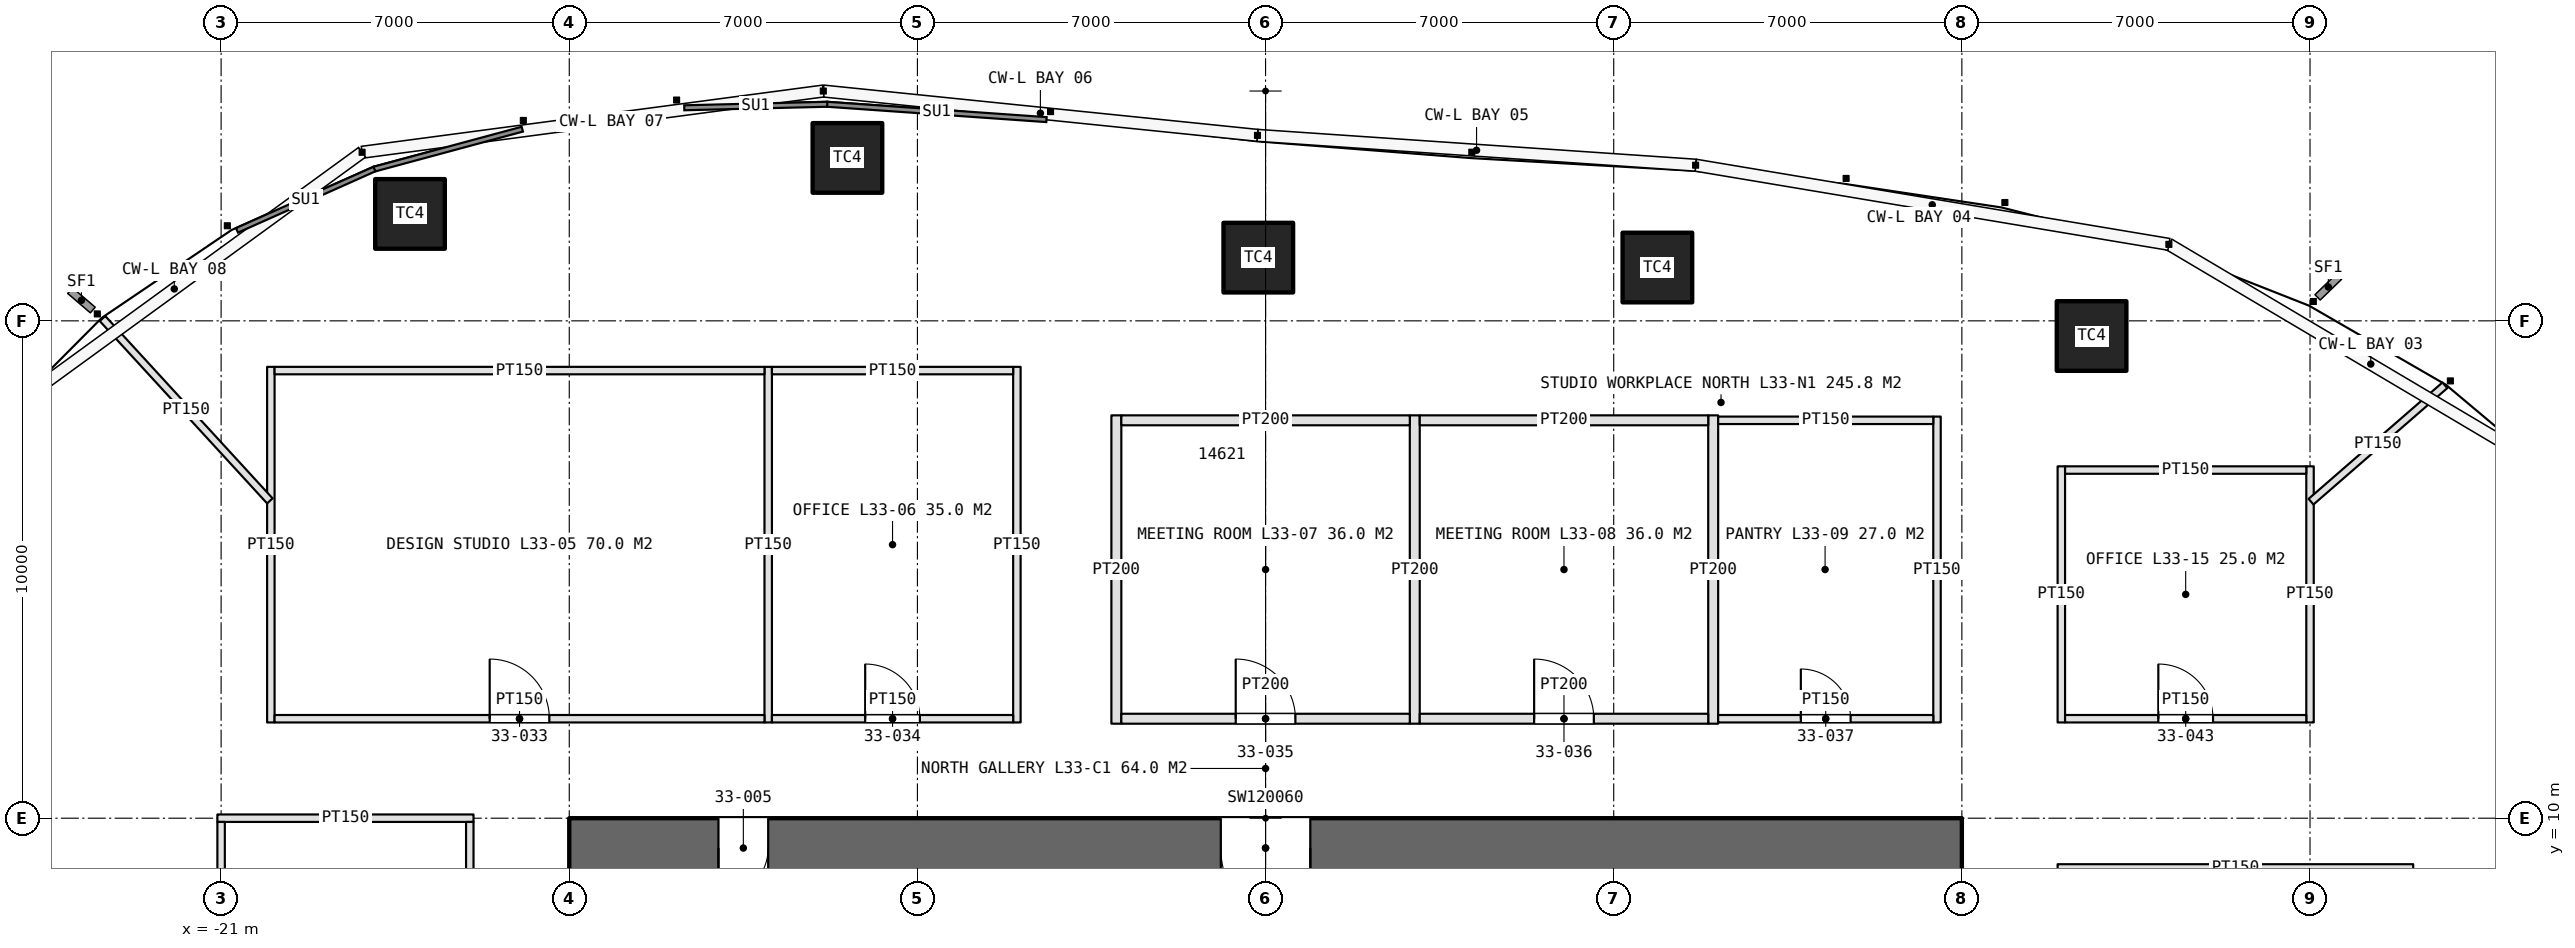
"""IFC4 building model, lengths in metres.
Left out: names, types, materials, properties, quantities, classifications, styles, units other than length and angle.
Written with IfcOpenShell. Run it as: python <this file> out.ifc"""

import sys

from ifc_helpers import new_model, si_unit, direction, frame, frame_2d, origin, origin_2d, place, context, subcontext, project, spatial, rectangle, extrude, element, fill, save


model = new_model("IFC4")
c1 = context("Model", 3, precision=1e-05, world=origin(), true_north=direction((0.0, 1.0)))
c2 = subcontext(c1, "Body", "Model", "MODEL_VIEW")
j1 = project(units=[si_unit("LENGTHUNIT", "METRE"), si_unit("PLANEANGLEUNIT", "RADIAN")], contexts=[c1])
p1 = place(None, origin())
s1 = spatial("IfcSite", under=j1, at=p1, CompositionType="ELEMENT")
p2 = place(p1, origin())
s2 = spatial("IfcBuilding", under=s1, at=p2, CompositionType="ELEMENT")
p3 = place(p2, frame((0.0, 0.0, 155.4)))
s3 = spatial("IfcBuildingStorey", under=s2, at=p3, CompositionType="ELEMENT", Elevation=155.4)
p4 = place(p3, frame((14.0, 9.4, 0.0), z_axis=(0.0, 0.0, 1.0), x_axis=(-1.0, 0.0, 0.0)))
e1 = element("IfcWall", 1, at=p4, inside=s3, PredefinedType="SHEAR", context=c2, shape_type="SweptSolid", body=[
    extrude(rectangle(XDim=28.0, YDim=1.2, at=frame_2d((14.0, 0.0))), origin(), (0.0, 0.0, 1.0), 4.2),
])
p5 = place(p4, frame((24.0, 0.0, 0.0)))
e2 = element("IfcOpeningElement", 2, at=p5, cuts=e1, PredefinedType="OPENING", context=c2, shape_type="SweptSolid", body=[
    extrude(rectangle(XDim=1.0, YDim=2.4, at=frame_2d((0.5, 1.2))), frame((0.0, 0.61, 0.0), z_axis=(0.0, -1.0, 0.0), x_axis=(1.0, 0.0, 0.0)), (0.0, 0.0, 1.0), 1.22),
])
p6 = place(p4, frame((13.1, 0.0, 0.0)))
e3 = element("IfcOpeningElement", 3, at=p6, cuts=e1, PredefinedType="OPENING", context=c2, shape_type="SweptSolid", body=[
    extrude(rectangle(XDim=1.8, YDim=2.4, at=frame_2d((0.9, 1.2))), frame((0.0, 0.61, 0.0), z_axis=(0.0, -1.0, 0.0), x_axis=(1.0, 0.0, 0.0)), (0.0, 0.0, 1.0), 1.22),
])
for number, where, z_axis, x_axis in (
    (4, (16.608, 19.695, 0.0), (0.0, 0.0, 1.0), (1.0, 0.0, 0.0)),
    (5, (7.878, 21.072, 0.0), (0.0, 0.0, 1.0), (1.0, 0.0, 0.0)),
    (6, (-0.146, 21.271, 0.0), (0.0, 0.0, 1.0), (1.0, 0.0, 0.0)),
    (7, (-8.407, 23.276, 0.0), (0.0, 0.0, 1.0), (1.0, 0.0, 0.0)),
    (8, (-17.202, 22.15, 0.0), (0.0, 0.0, 1.0), (1.0, 0.0, 0.0)),
):
    element("IfcColumn", number, at=place(p3, frame(where, z_axis=z_axis, x_axis=x_axis)), inside=s3, PredefinedType="COLUMN", context=c2, shape_type="SweptSolid", body=[
        extrude(rectangle(XDim=1.4, YDim=1.4, at=origin_2d()), origin(), (0.0, 0.0, 1.0), 4.2),
    ])
for number, where, z_axis, x_axis in (
    (9, (-20.0, 11.925, 0.0), (0.0, 0.0, 1.0), (0.0, 1.0, 0.0)),
    (10, (-10.0, 11.925, 0.0), (0.0, 0.0, 1.0), (0.0, 1.0, 0.0)),
    (11, (-5.0, 11.925, 0.0), (0.0, 0.0, 1.0), (0.0, 1.0, 0.0)),
):
    element("IfcWall", number, at=place(p3, frame(where, z_axis=z_axis, x_axis=x_axis)), inside=s3, PredefinedType="PARTITIONING", context=c2, shape_type="SweptSolid", body=[
        extrude(rectangle(XDim=7.15, YDim=0.15, at=frame_2d((3.575, 0.0))), origin(), (0.0, 0.0, 1.0), 3.0),
    ])
p7 = place(p3, frame((-19.925, 12.0, 0.0), z_axis=(0.0, 0.0, 1.0), x_axis=(1.0, 0.0, 0.0)))
e12 = element("IfcWall", 12, at=p7, inside=s3, PredefinedType="PARTITIONING", context=c2, shape_type="SweptSolid", body=[
    extrude(rectangle(XDim=9.85, YDim=0.15, at=frame_2d((4.925, 0.0))), origin(), (0.0, 0.0, 1.0), 3.0),
])
p8 = place(p7, frame((4.325, 0.0, 0.0)))
e13 = element("IfcOpeningElement", 13, at=p8, cuts=e12, PredefinedType="OPENING", context=c2, shape_type="SweptSolid", body=[
    extrude(rectangle(XDim=1.2, YDim=2.4, at=frame_2d((0.6, 1.2))), frame((0.0, 0.085, 0.0), z_axis=(0.0, -1.0, 0.0), x_axis=(1.0, 0.0, 0.0)), (0.0, 0.0, 1.0), 0.17),
])
p9 = place(p3, frame((-19.925, 19.0, 0.0), z_axis=(0.0, 0.0, 1.0), x_axis=(1.0, 0.0, 0.0)))
e14 = element("IfcWall", 14, at=p9, inside=s3, PredefinedType="PARTITIONING", context=c2, shape_type="SweptSolid", body=[
    extrude(rectangle(XDim=9.85, YDim=0.15, at=frame_2d((4.925, 0.0))), origin(), (0.0, 0.0, 1.0), 3.0),
])
p10 = place(p3, frame((-9.925, 12.0, 0.0), z_axis=(0.0, 0.0, 1.0), x_axis=(1.0, 0.0, 0.0)))
e15 = element("IfcWall", 15, at=p10, inside=s3, PredefinedType="PARTITIONING", context=c2, shape_type="SweptSolid", body=[
    extrude(rectangle(XDim=4.85, YDim=0.15, at=frame_2d((2.425, 0.0))), origin(), (0.0, 0.0, 1.0), 3.0),
])
p11 = place(p10, frame((1.875, 0.0, 0.0)))
e16 = element("IfcOpeningElement", 16, at=p11, cuts=e15, PredefinedType="OPENING", context=c2, shape_type="SweptSolid", body=[
    extrude(rectangle(XDim=1.1, YDim=2.3, at=frame_2d((0.55, 1.15))), frame((0.0, 0.085, 0.0), z_axis=(0.0, -1.0, 0.0), x_axis=(1.0, 0.0, 0.0)), (0.0, 0.0, 1.0), 0.17),
])
p12 = place(p3, frame((-9.925, 19.0, 0.0), z_axis=(0.0, 0.0, 1.0), x_axis=(1.0, 0.0, 0.0)))
e17 = element("IfcWall", 17, at=p12, inside=s3, PredefinedType="PARTITIONING", context=c2, shape_type="SweptSolid", body=[
    extrude(rectangle(XDim=4.85, YDim=0.15, at=frame_2d((2.425, 0.0))), origin(), (0.0, 0.0, 1.0), 3.0),
])
for number, where, z_axis, x_axis in (
    (18, (-3.0, 11.9, 0.0), (0.0, 0.0, 1.0), (0.0, 1.0, 0.0)),
    (19, (3.0, 11.9, 0.0), (0.0, 0.0, 1.0), (0.0, 1.0, 0.0)),
    (20, (9.0, 11.9, 0.0), (0.0, 0.0, 1.0), (0.0, 1.0, 0.0)),
):
    element("IfcWall", number, at=place(p3, frame(where, z_axis=z_axis, x_axis=x_axis)), inside=s3, PredefinedType="PARTITIONING", context=c2, shape_type="SweptSolid", body=[
        extrude(rectangle(XDim=6.2, YDim=0.2, at=frame_2d((3.1, 0.0))), origin(), (0.0, 0.0, 1.0), 3.0),
    ])
p13 = place(p3, frame((13.5, 11.925, 0.0), z_axis=(0.0, 0.0, 1.0), x_axis=(0.0, 1.0, 0.0)))
e21 = element("IfcWall", 21, at=p13, inside=s3, PredefinedType="PARTITIONING", context=c2, shape_type="SweptSolid", body=[
    extrude(rectangle(XDim=6.15, YDim=0.15, at=frame_2d((3.075, 0.0))), origin(), (0.0, 0.0, 1.0), 3.0),
])
p14 = place(p3, frame((-2.9, 12.0, 0.0), z_axis=(0.0, 0.0, 1.0), x_axis=(1.0, 0.0, 0.0)))
e22 = element("IfcWall", 22, at=p14, inside=s3, PredefinedType="PARTITIONING", context=c2, shape_type="SweptSolid", body=[
    extrude(rectangle(XDim=5.8, YDim=0.2, at=frame_2d((2.9, 0.0))), origin(), (0.0, 0.0, 1.0), 3.0),
])
p15 = place(p14, frame((2.3, 0.0, 0.0)))
e23 = element("IfcOpeningElement", 23, at=p15, cuts=e22, PredefinedType="OPENING", context=c2, shape_type="SweptSolid", body=[
    extrude(rectangle(XDim=1.2, YDim=2.4, at=frame_2d((0.6, 1.2))), frame((0.0, 0.11, 0.0), z_axis=(0.0, -1.0, 0.0), x_axis=(1.0, 0.0, 0.0)), (0.0, 0.0, 1.0), 0.22),
])
p16 = place(p3, frame((-2.9, 18.0, 0.0), z_axis=(0.0, 0.0, 1.0), x_axis=(1.0, 0.0, 0.0)))
e24 = element("IfcWall", 24, at=p16, inside=s3, PredefinedType="PARTITIONING", context=c2, shape_type="SweptSolid", body=[
    extrude(rectangle(XDim=5.8, YDim=0.2, at=frame_2d((2.9, 0.0))), origin(), (0.0, 0.0, 1.0), 3.0),
])
p17 = place(p3, frame((3.1, 12.0, 0.0), z_axis=(0.0, 0.0, 1.0), x_axis=(1.0, 0.0, 0.0)))
e25 = element("IfcWall", 25, at=p17, inside=s3, PredefinedType="PARTITIONING", context=c2, shape_type="SweptSolid", body=[
    extrude(rectangle(XDim=5.8, YDim=0.2, at=frame_2d((2.9, 0.0))), origin(), (0.0, 0.0, 1.0), 3.0),
])
p18 = place(p17, frame((2.3, 0.0, 0.0)))
e26 = element("IfcOpeningElement", 26, at=p18, cuts=e25, PredefinedType="OPENING", context=c2, shape_type="SweptSolid", body=[
    extrude(rectangle(XDim=1.2, YDim=2.4, at=frame_2d((0.6, 1.2))), frame((0.0, 0.11, 0.0), z_axis=(0.0, -1.0, 0.0), x_axis=(1.0, 0.0, 0.0)), (0.0, 0.0, 1.0), 0.22),
])
p19 = place(p3, frame((3.1, 18.0, 0.0), z_axis=(0.0, 0.0, 1.0), x_axis=(1.0, 0.0, 0.0)))
e27 = element("IfcWall", 27, at=p19, inside=s3, PredefinedType="PARTITIONING", context=c2, shape_type="SweptSolid", body=[
    extrude(rectangle(XDim=5.8, YDim=0.2, at=frame_2d((2.9, 0.0))), origin(), (0.0, 0.0, 1.0), 3.0),
])
p20 = place(p3, frame((9.1, 12.0, 0.0), z_axis=(0.0, 0.0, 1.0), x_axis=(1.0, 0.0, 0.0)))
e28 = element("IfcWall", 28, at=p20, inside=s3, PredefinedType="PARTITIONING", context=c2, shape_type="SweptSolid", body=[
    extrude(rectangle(XDim=4.325, YDim=0.15, at=frame_2d((2.163, 0.0))), origin(), (0.0, 0.0, 1.0), 3.0),
])
p21 = place(p20, frame((1.663, 0.0, 0.0)))
e29 = element("IfcOpeningElement", 29, at=p21, cuts=e28, PredefinedType="OPENING", context=c2, shape_type="SweptSolid", body=[
    extrude(rectangle(XDim=1.0, YDim=2.2, at=frame_2d((0.5, 1.1))), frame((0.0, 0.085, 0.0), z_axis=(0.0, -1.0, 0.0), x_axis=(1.0, 0.0, 0.0)), (0.0, 0.0, 1.0), 0.17),
])
p22 = place(p3, frame((9.1, 18.0, 0.0), z_axis=(0.0, 0.0, 1.0), x_axis=(1.0, 0.0, 0.0)))
e30 = element("IfcWall", 30, at=p22, inside=s3, PredefinedType="PARTITIONING", context=c2, shape_type="SweptSolid", body=[
    extrude(rectangle(XDim=4.325, YDim=0.15, at=frame_2d((2.163, 0.0))), origin(), (0.0, 0.0, 1.0), 3.0),
])
p23 = place(p3, frame((15.925, 9.0, 0.0), z_axis=(0.0, 0.0, 1.0), x_axis=(1.0, 0.0, 0.0)))
e31 = element("IfcWall", 31, at=p23, inside=s3, PredefinedType="PARTITIONING", context=c2, shape_type="SweptSolid", body=[
    extrude(rectangle(XDim=7.15, YDim=0.15, at=frame_2d((3.575, 0.0))), origin(), (0.0, 0.0, 1.0), 3.0),
])
for number, where, z_axis, x_axis in (
    (32, (16.0, 11.925, 0.0), (0.0, 0.0, 1.0), (0.0, 1.0, 0.0)),
    (33, (21.0, 11.925, 0.0), (0.0, 0.0, 1.0), (0.0, 1.0, 0.0)),
):
    element("IfcWall", number, at=place(p3, frame(where, z_axis=z_axis, x_axis=x_axis)), inside=s3, PredefinedType="PARTITIONING", context=c2, shape_type="SweptSolid", body=[
        extrude(rectangle(XDim=5.15, YDim=0.15, at=frame_2d((2.575, 0.0))), origin(), (0.0, 0.0, 1.0), 3.0),
    ])
p24 = place(p3, frame((16.075, 12.0, 0.0), z_axis=(0.0, 0.0, 1.0), x_axis=(1.0, 0.0, 0.0)))
e34 = element("IfcWall", 34, at=p24, inside=s3, PredefinedType="PARTITIONING", context=c2, shape_type="SweptSolid", body=[
    extrude(rectangle(XDim=4.85, YDim=0.15, at=frame_2d((2.425, 0.0))), origin(), (0.0, 0.0, 1.0), 3.0),
])
p25 = place(p24, frame((1.875, 0.0, 0.0)))
e35 = element("IfcOpeningElement", 35, at=p25, cuts=e34, PredefinedType="OPENING", context=c2, shape_type="SweptSolid", body=[
    extrude(rectangle(XDim=1.1, YDim=2.3, at=frame_2d((0.55, 1.15))), frame((0.0, 0.085, 0.0), z_axis=(0.0, -1.0, 0.0), x_axis=(1.0, 0.0, 0.0)), (0.0, 0.0, 1.0), 0.17),
])
p26 = place(p3, frame((16.075, 17.0, 0.0), z_axis=(0.0, 0.0, 1.0), x_axis=(1.0, 0.0, 0.0)))
e36 = element("IfcWall", 36, at=p26, inside=s3, PredefinedType="PARTITIONING", context=c2, shape_type="SweptSolid", body=[
    extrude(rectangle(XDim=4.85, YDim=0.15, at=frame_2d((2.425, 0.0))), origin(), (0.0, 0.0, 1.0), 3.0),
])
p27 = place(p3, frame((-15.925, 10.0, 0.0), z_axis=(0.0, 0.0, 1.0), x_axis=(-1.0, 0.0, 0.0)))
e37 = element("IfcWall", 37, at=p27, inside=s3, PredefinedType="PARTITIONING", context=c2, shape_type="SweptSolid", body=[
    extrude(rectangle(XDim=5.15, YDim=0.15, at=frame_2d((2.575, 0.0))), origin(), (0.0, 0.0, 1.0), 3.0),
])
p28 = place(p3, frame((-16.0, 4.075, 0.0), z_axis=(0.0, 0.0, 1.0), x_axis=(0.0, 1.0, 0.0)))
e38 = element("IfcWall", 38, at=p28, inside=s3, PredefinedType="PARTITIONING", context=c2, shape_type="SweptSolid", body=[
    extrude(rectangle(XDim=5.85, YDim=0.15, at=frame_2d((2.925, 0.0))), origin(), (0.0, 0.0, 1.0), 3.0),
])
p29 = place(p28, frame((2.375, 0.0, 0.0)))
e39 = element("IfcOpeningElement", 39, at=p29, cuts=e38, PredefinedType="OPENING", context=c2, shape_type="SweptSolid", body=[
    extrude(rectangle(XDim=1.1, YDim=2.3, at=frame_2d((0.55, 1.15))), frame((0.0, 0.085, 0.0), z_axis=(0.0, -1.0, 0.0), x_axis=(1.0, 0.0, 0.0)), (0.0, 0.0, 1.0), 0.17),
])
p30 = place(p3, frame((-21.0, 4.075, 0.0), z_axis=(0.0, 0.0, 1.0), x_axis=(0.0, 1.0, 0.0)))
e40 = element("IfcWall", 40, at=p30, inside=s3, PredefinedType="PARTITIONING", context=c2, shape_type="SweptSolid", body=[
    extrude(rectangle(XDim=5.85, YDim=0.15, at=frame_2d((2.925, 0.0))), origin(), (0.0, 0.0, 1.0), 3.0),
])
p31 = place(p3, frame((-20.02, 16.38, 0.0), z_axis=(0.0, 0.0, 1.0), x_axis=(-0.676159982548, 0.736754828963, 0.0)))
e41 = element("IfcWall", 41, at=p31, inside=s3, PredefinedType="PARTITIONING", context=c2, shape_type="SweptSolid", body=[
    extrude(rectangle(XDim=4.976, YDim=0.15, at=frame_2d((2.488, 0.0))), origin(), (0.0, 0.0, 1.0), 3.0),
])
p32 = place(p3, frame((21.02, 16.364, 0.0), z_axis=(0.0, 0.0, 1.0), x_axis=(0.75467183248, 0.656102450278, 0.0)))
e42 = element("IfcWall", 42, at=p32, inside=s3, PredefinedType="PARTITIONING", context=c2, shape_type="SweptSolid", body=[
    extrude(rectangle(XDim=3.567, YDim=0.15, at=frame_2d((1.783, 0.0))), origin(), (0.0, 0.0, 1.0), 3.0),
])
p33 = place(p5, origin())
e43 = element("IfcDoor", 43, at=p33, inside=s3, OperationType="SINGLE_SWING_RIGHT", PredefinedType="DOOR", context=c2, shape_type="SweptSolid", body=[
    extrude(rectangle(XDim=1.0, YDim=2.4, at=frame_2d((0.5, 1.2))), frame((0.0, 0.025, 0.0), z_axis=(0.0, -1.0, 0.0), x_axis=(1.0, 0.0, 0.0)), (0.0, 0.0, 1.0), 0.05),
])
fill(e2, e43)
p34 = place(p6, origin())
e44 = element("IfcDoor", 44, at=p34, inside=s3, OperationType="DOUBLE_DOOR_SINGLE_SWING", PredefinedType="DOOR", context=c2, shape_type="SweptSolid", body=[
    extrude(rectangle(XDim=1.8, YDim=2.4, at=frame_2d((0.9, 1.2))), frame((0.0, 0.025, 0.0), z_axis=(0.0, -1.0, 0.0), x_axis=(1.0, 0.0, 0.0)), (0.0, 0.0, 1.0), 0.05),
])
fill(e3, e44)
p35 = place(p8, origin())
e45 = element("IfcDoor", 45, at=p35, inside=s3, OperationType="SINGLE_SWING_LEFT", PredefinedType="DOOR", context=c2, shape_type="SweptSolid", body=[
    extrude(rectangle(XDim=1.2, YDim=2.4, at=frame_2d((0.6, 1.2))), frame((0.0, 0.025, 0.0), z_axis=(0.0, -1.0, 0.0), x_axis=(1.0, 0.0, 0.0)), (0.0, 0.0, 1.0), 0.05),
])
fill(e13, e45)
p36 = place(p11, origin())
e46 = element("IfcDoor", 46, at=p36, inside=s3, OperationType="SINGLE_SWING_LEFT", PredefinedType="DOOR", context=c2, shape_type="SweptSolid", body=[
    extrude(rectangle(XDim=1.1, YDim=2.3, at=frame_2d((0.55, 1.15))), frame((0.0, 0.025, 0.0), z_axis=(0.0, -1.0, 0.0), x_axis=(1.0, 0.0, 0.0)), (0.0, 0.0, 1.0), 0.05),
])
fill(e16, e46)
p37 = place(p15, origin())
e47 = element("IfcDoor", 47, at=p37, inside=s3, OperationType="SINGLE_SWING_LEFT", PredefinedType="DOOR", context=c2, shape_type="SweptSolid", body=[
    extrude(rectangle(XDim=1.2, YDim=2.4, at=frame_2d((0.6, 1.2))), frame((0.0, 0.025, 0.0), z_axis=(0.0, -1.0, 0.0), x_axis=(1.0, 0.0, 0.0)), (0.0, 0.0, 1.0), 0.05),
])
fill(e23, e47)
p38 = place(p18, origin())
e48 = element("IfcDoor", 48, at=p38, inside=s3, OperationType="SINGLE_SWING_LEFT", PredefinedType="DOOR", context=c2, shape_type="SweptSolid", body=[
    extrude(rectangle(XDim=1.2, YDim=2.4, at=frame_2d((0.6, 1.2))), frame((0.0, 0.025, 0.0), z_axis=(0.0, -1.0, 0.0), x_axis=(1.0, 0.0, 0.0)), (0.0, 0.0, 1.0), 0.05),
])
fill(e26, e48)
p39 = place(p21, origin())
e49 = element("IfcDoor", 49, at=p39, inside=s3, OperationType="SINGLE_SWING_LEFT", PredefinedType="DOOR", context=c2, shape_type="SweptSolid", body=[
    extrude(rectangle(XDim=1.0, YDim=2.2, at=frame_2d((0.5, 1.1))), frame((0.0, 0.025, 0.0), z_axis=(0.0, -1.0, 0.0), x_axis=(1.0, 0.0, 0.0)), (0.0, 0.0, 1.0), 0.05),
])
fill(e29, e49)
p40 = place(p25, origin())
e50 = element("IfcDoor", 50, at=p40, inside=s3, OperationType="SINGLE_SWING_LEFT", PredefinedType="DOOR", context=c2, shape_type="SweptSolid", body=[
    extrude(rectangle(XDim=1.1, YDim=2.3, at=frame_2d((0.55, 1.15))), frame((0.0, 0.025, 0.0), z_axis=(0.0, -1.0, 0.0), x_axis=(1.0, 0.0, 0.0)), (0.0, 0.0, 1.0), 0.05),
])
fill(e35, e50)
save(model, sys.argv[1])
